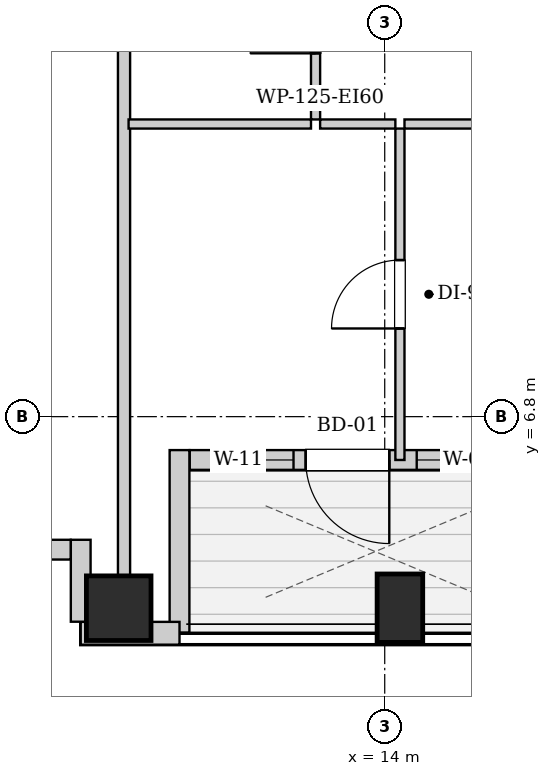
"""IFC4 building model, lengths in metres.
Left out: names, types, materials, properties, quantities, classifications, styles, units other than length and angle.
Written with IfcOpenShell. Run it as: python <this file> out.ifc"""

import sys

from ifc_helpers import new_model, si_unit, direction, frame, frame_2d, origin, origin_2d, place, context, subcontext, project, spatial, rectangle, extrude, element, fill, save


model = new_model("IFC4")
c1 = context("Model", 3, precision=1e-05, world=origin(), true_north=direction((0.0, 1.0)))
c2 = subcontext(c1, "Body", "Model", "MODEL_VIEW")
j1 = project(units=[si_unit("LENGTHUNIT", "METRE"), si_unit("PLANEANGLEUNIT", "RADIAN")], contexts=[c1])
p1 = place(None, origin())
s1 = spatial("IfcSite", under=j1, at=p1, CompositionType="ELEMENT")
p2 = place(p1, origin())
s2 = spatial("IfcBuilding", under=s1, at=p2, CompositionType="ELEMENT")
p3 = place(p2, frame((0.0, 0.0, 156.9)))
s3 = spatial("IfcBuildingStorey", under=s2, at=p3, CompositionType="ELEMENT", Elevation=156.9)
p4 = place(p3, frame((10.5, 4.28, 0.0), z_axis=(0.0, 0.0, 1.0), x_axis=(1.0, 0.0, 0.0)))
e1 = element("IfcColumn", 1, at=p4, inside=s3, PredefinedType="COLUMN", context=c2, shape_type="SweptSolid", body=[
    extrude(rectangle(XDim=0.85, YDim=0.85, at=origin_2d()), origin(), (0.0, 0.0, 1.0), 3.25),
])
p5 = place(p3, frame((14.2, 4.28, 0.0), z_axis=(0.0, 0.0, 1.0), x_axis=(1.0, 0.0, 0.0)))
e2 = element("IfcColumn", 2, at=p5, inside=s3, PredefinedType="COLUMN", context=c2, shape_type="SweptSolid", body=[
    extrude(rectangle(XDim=0.6, YDim=0.9, at=origin_2d()), origin(), (0.0, 0.0, 1.0), 3.25),
])
p6 = place(p3, frame((16.316, 6.23, 0.0), z_axis=(0.0, 0.0, 1.0), x_axis=(-1.0, 0.0, 0.0)))
e3 = element("IfcWall", 3, at=p6, inside=s3, PredefinedType="SOLIDWALL", context=c2, shape_type="SweptSolid", body=[
    extrude(rectangle(XDim=4.882, YDim=0.26, at=frame_2d((2.441, 0.0))), origin(), (0.0, 0.0, 1.0), 2.99),
])
p7 = place(p6, frame((2.256, 0.0, 0.0)))
e4 = element("IfcOpeningElement", 4, at=p7, cuts=e3, PredefinedType="OPENING", context=c2, shape_type="SweptSolid", body=[
    extrude(rectangle(XDim=1.1, YDim=2.0, at=frame_2d((0.55, 1.0))), frame((0.0, 0.14, 0.0), z_axis=(0.0, -1.0, 0.0), x_axis=(1.0, 0.0, 0.0)), (0.0, 0.0, 1.0), 0.28),
])
p8 = place(p6, frame((3.516, 0.0, 0.55)))
e5 = element("IfcOpeningElement", 5, at=p8, cuts=e3, PredefinedType="OPENING", context=c2, shape_type="SweptSolid", body=[
    extrude(rectangle(XDim=0.85, YDim=1.2, at=frame_2d((0.425, 0.6))), frame((0.0, 0.14, 0.0), z_axis=(0.0, -1.0, 0.0), x_axis=(1.0, 0.0, 0.0)), (0.0, 0.0, 1.0), 0.28),
])
p9 = place(p6, frame((0.545, 0.0, 0.85)))
e6 = element("IfcOpeningElement", 6, at=p9, cuts=e3, PredefinedType="OPENING", context=c2, shape_type="SweptSolid", body=[
    extrude(rectangle(XDim=1.35, YDim=1.65, at=frame_2d((0.675, 0.825))), frame((0.0, 0.14, 0.0), z_axis=(0.0, -1.0, 0.0), x_axis=(1.0, 0.0, 0.0)), (0.0, 0.0, 1.0), 0.28),
])
p10 = place(p3, frame((11.3, 6.36, 0.0), z_axis=(0.0, 0.0, 1.0), x_axis=(0.0, -1.0, 0.0)))
e7 = element("IfcWall", 7, at=p10, inside=s3, PredefinedType="SOLIDWALL", context=c2, shape_type="SweptSolid", body=[
    extrude(rectangle(XDim=2.4, YDim=0.26, at=frame_2d((1.2, 0.0))), origin(), (0.0, 0.0, 1.0), 2.99),
])
p11 = place(p3, frame((11.3, 3.95, 0.0), z_axis=(0.0, 0.0, 1.0), x_axis=(-1.0, 0.0, 0.0)))
e8 = element("IfcWall", 8, at=p11, inside=s3, PredefinedType="SOLIDWALL", context=c2, shape_type="SweptSolid", body=[
    extrude(rectangle(XDim=1.3, YDim=0.3, at=frame_2d((0.65, 0.0))), origin(), (0.0, 0.0, 1.0), 2.99),
])
p12 = place(p3, frame((10.0, 4.102, 0.0), z_axis=(0.0, 0.0, 1.0), x_axis=(0.0, 1.0, 0.0)))
e9 = element("IfcWall", 9, at=p12, inside=s3, PredefinedType="SOLIDWALL", context=c2, shape_type="SweptSolid", body=[
    extrude(rectangle(XDim=1.078, YDim=0.26, at=frame_2d((0.539, 0.0))), origin(), (0.0, 0.0, 1.0), 2.99),
])
p13 = place(p3, frame((9.868, 5.05, 0.0), z_axis=(0.0, 0.0, 1.0), x_axis=(-1.0, 0.0, 0.0)))
e10 = element("IfcWall", 10, at=p13, inside=s3, PredefinedType="SOLIDWALL", context=c2, shape_type="SweptSolid", body=[
    extrude(rectangle(XDim=1.248, YDim=0.26, at=frame_2d((0.624, 0.0))), origin(), (0.0, 0.0, 1.0), 2.99),
])
p14 = place(p3, frame((10.57, 4.08, 0.0), z_axis=(0.0, 0.0, 1.0), x_axis=(0.0, 1.0, 0.0)))
e11 = element("IfcWall", 11, at=p14, inside=s3, PredefinedType="PARTITIONING", context=c2, shape_type="SweptSolid", body=[
    extrude(rectangle(XDim=9.23, YDim=0.16, at=frame_2d((4.615, 0.0))), origin(), (0.0, 0.0, 1.0), 2.99),
])
p15 = place(p3, frame((13.09, 10.71, 0.0), z_axis=(0.0, 0.0, 1.0), x_axis=(0.0, 1.0, 0.0)))
e12 = element("IfcWall", 12, at=p15, inside=s3, PredefinedType="PARTITIONING", context=c2, shape_type="SweptSolid", body=[
    extrude(rectangle(XDim=2.6, YDim=0.12, at=frame_2d((1.3, 0.0))), origin(), (0.0, 0.0, 1.0), 2.99),
])
p16 = place(p15, frame((0.87, 0.0, 0.0)))
e13 = element("IfcOpeningElement", 13, at=p16, cuts=e12, PredefinedType="OPENING", context=c2, shape_type="SweptSolid", body=[
    extrude(rectangle(XDim=0.86, YDim=2.05, at=frame_2d((0.43, 1.025))), frame((0.0, 0.07, 0.0), z_axis=(0.0, -1.0, 0.0), x_axis=(1.0, 0.0, 0.0)), (0.0, 0.0, 1.0), 0.14),
])
p17 = place(p3, frame((10.63, 10.65, 0.0), z_axis=(0.0, 0.0, 1.0), x_axis=(1.0, 0.0, 0.0)))
e14 = element("IfcWall", 14, at=p17, inside=s3, PredefinedType="PARTITIONING", context=c2, shape_type="SweptSolid", body=[
    extrude(rectangle(XDim=2.4, YDim=0.12, at=frame_2d((1.2, 0.0))), origin(), (0.0, 0.0, 1.0), 2.99),
])
p18 = place(p3, frame((13.15, 10.65, 0.0), z_axis=(0.0, 0.0, 1.0), x_axis=(1.0, 0.0, 0.0)))
e15 = element("IfcWall", 15, at=p18, inside=s3, PredefinedType="PARTITIONING", context=c2, shape_type="SweptSolid", body=[
    extrude(rectangle(XDim=0.99, YDim=0.12, at=frame_2d((0.495, 0.0))), origin(), (0.0, 0.0, 1.0), 2.99),
])
p19 = place(p3, frame((14.26, 10.65, 0.0), z_axis=(0.0, 0.0, 1.0), x_axis=(1.0, 0.0, 0.0)))
e16 = element("IfcWall", 16, at=p19, inside=s3, PredefinedType="PARTITIONING", context=c2, shape_type="SweptSolid", body=[
    extrude(rectangle(XDim=3.07, YDim=0.12, at=frame_2d((1.535, 0.0))), origin(), (0.0, 0.0, 1.0), 2.99),
])
p20 = place(p19, frame((1.085, 0.0, 0.0)))
e17 = element("IfcOpeningElement", 17, at=p20, cuts=e16, PredefinedType="OPENING", context=c2, shape_type="SweptSolid", body=[
    extrude(rectangle(XDim=0.9, YDim=2.05, at=frame_2d((0.45, 1.025))), frame((0.0, 0.07, 0.0), z_axis=(0.0, -1.0, 0.0), x_axis=(1.0, 0.0, 0.0)), (0.0, 0.0, 1.0), 0.14),
])
p21 = place(p3, frame((14.2, 6.23, 0.0), z_axis=(0.0, 0.0, 1.0), x_axis=(0.0, 1.0, 0.0)))
e18 = element("IfcWall", 18, at=p21, inside=s3, PredefinedType="PARTITIONING", context=c2, shape_type="SweptSolid", body=[
    extrude(rectangle(XDim=4.36, YDim=0.12, at=frame_2d((2.18, 0.0))), origin(), (0.0, 0.0, 1.0), 2.99),
])
p22 = place(p21, frame((1.73, 0.0, 0.0)))
e19 = element("IfcOpeningElement", 19, at=p22, cuts=e18, PredefinedType="OPENING", context=c2, shape_type="SweptSolid", body=[
    extrude(rectangle(XDim=0.9, YDim=2.05, at=frame_2d((0.45, 1.025))), frame((0.0, 0.07, 0.0), z_axis=(0.0, -1.0, 0.0), x_axis=(1.0, 0.0, 0.0)), (0.0, 0.0, 1.0), 0.14),
])
p23 = place(p16, origin())
e20 = element("IfcDoor", 20, at=p23, inside=s3, OperationType="SINGLE_SWING_LEFT", PredefinedType="DOOR", context=c2, shape_type="SweptSolid", body=[
    extrude(rectangle(XDim=0.86, YDim=2.05, at=frame_2d((0.43, 1.025))), frame((0.0, 0.025, 0.0), z_axis=(0.0, -1.0, 0.0), x_axis=(1.0, 0.0, 0.0)), (0.0, 0.0, 1.0), 0.05),
])
fill(e13, e20)
p24 = place(p22, origin())
e21 = element("IfcDoor", 21, at=p24, inside=s3, OperationType="SINGLE_SWING_LEFT", PredefinedType="DOOR", context=c2, shape_type="SweptSolid", body=[
    extrude(rectangle(XDim=0.9, YDim=2.05, at=frame_2d((0.45, 1.025))), frame((0.0, 0.025, 0.0), z_axis=(0.0, -1.0, 0.0), x_axis=(1.0, 0.0, 0.0)), (0.0, 0.0, 1.0), 0.05),
])
fill(e19, e21)
p25 = place(p7, origin())
e22 = element("IfcDoor", 22, at=p25, inside=s3, OperationType="SINGLE_SWING_LEFT", PredefinedType="DOOR", context=c2, shape_type="SweptSolid", body=[
    extrude(rectangle(XDim=1.1, YDim=2.0, at=frame_2d((0.55, 1.0))), frame((0.0, 0.025, 0.0), z_axis=(0.0, -1.0, 0.0), x_axis=(1.0, 0.0, 0.0)), (0.0, 0.0, 1.0), 0.05),
])
fill(e4, e22)
p26 = place(p8, origin())
e23 = element("IfcWindow", 23, at=p26, inside=s3, PartitioningType="SINGLE_PANEL", PredefinedType="WINDOW", context=c2, shape_type="SweptSolid", body=[
    extrude(rectangle(XDim=0.85, YDim=1.2, at=frame_2d((0.425, 0.6))), frame((0.0, 0.03, 0.0), z_axis=(0.0, -1.0, 0.0), x_axis=(1.0, 0.0, 0.0)), (0.0, 0.0, 1.0), 0.06),
])
fill(e5, e23)
p27 = place(p9, origin())
e24 = element("IfcWindow", 24, at=p27, inside=s3, PartitioningType="SINGLE_PANEL", PredefinedType="WINDOW", context=c2, shape_type="SweptSolid", body=[
    extrude(rectangle(XDim=1.35, YDim=1.65, at=frame_2d((0.675, 0.825))), frame((0.0, 0.03, 0.0), z_axis=(0.0, -1.0, 0.0), x_axis=(1.0, 0.0, 0.0)), (0.0, 0.0, 1.0), 0.06),
])
fill(e6, e24)
save(model, sys.argv[1])
